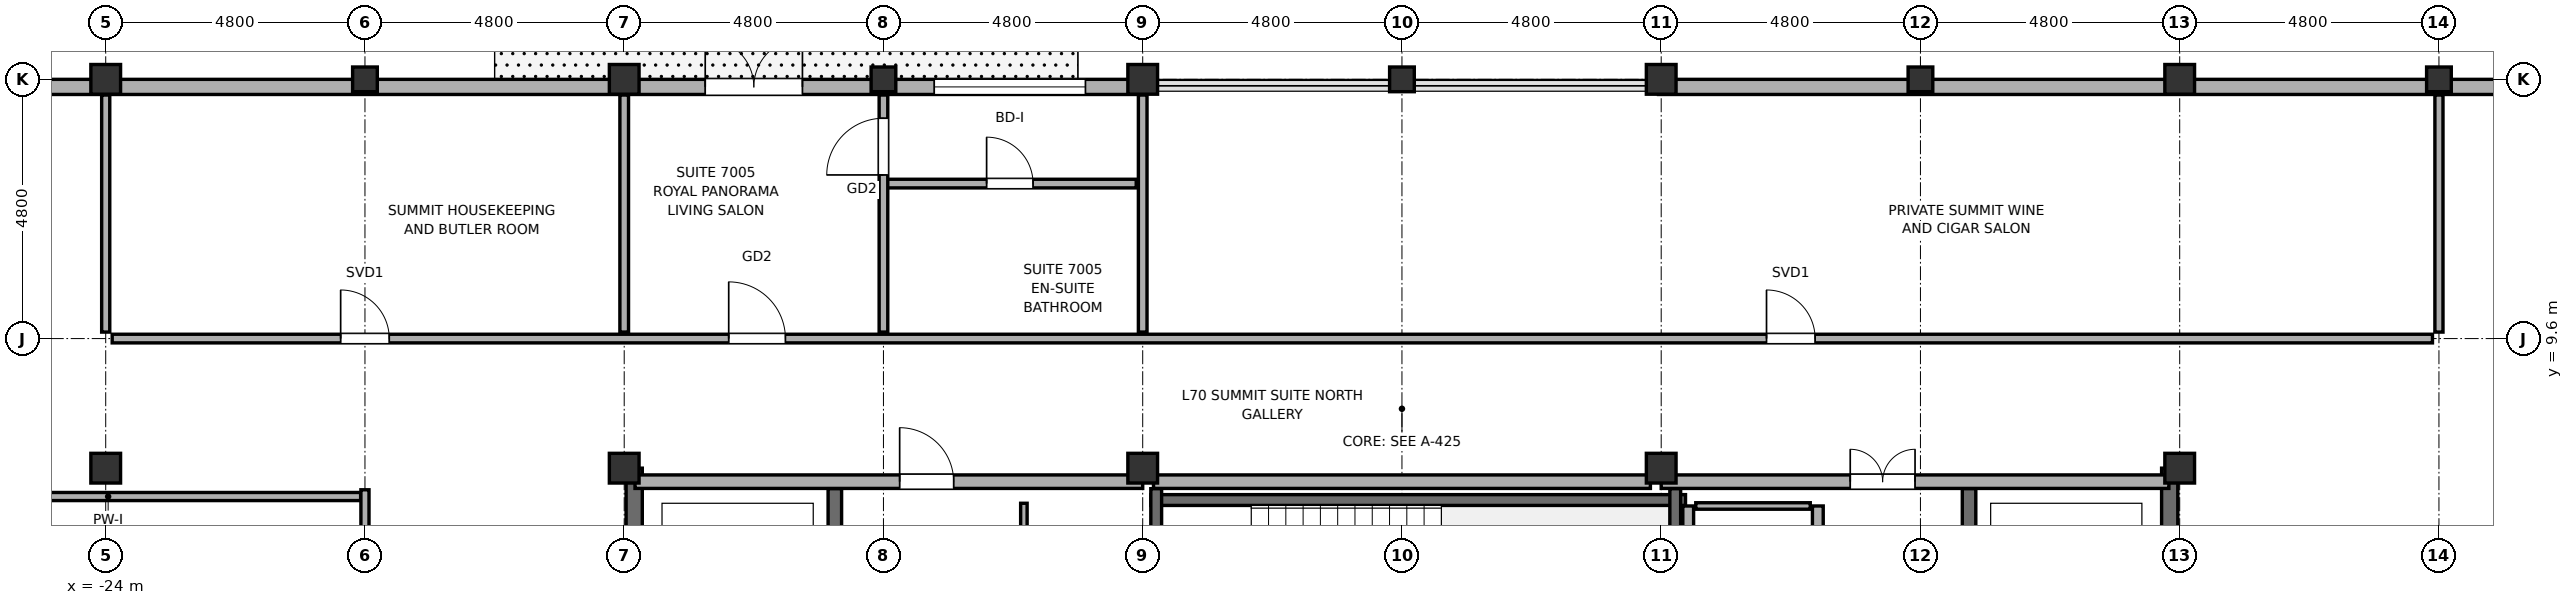
"""IFC4 building model, lengths in metres.
Left out: names, types, materials, properties, quantities, classifications, styles, units other than length and angle.
Written with IfcOpenShell. Run it as: python <this file> out.ifc"""

import sys

from ifc_helpers import new_model, si_unit, direction, frame, frame_2d, origin, origin_2d, place, context, subcontext, project, spatial, rectangle, hollow_rectangle, hollow_circle, extrude, element, fill, save


model = new_model("IFC4")
c1 = context("Model", 3, precision=1e-05, world=origin(), true_north=direction((0.0, 1.0)))
c2 = subcontext(c1, "Body", "Model", "MODEL_VIEW")
j1 = project(units=[si_unit("LENGTHUNIT", "METRE"), si_unit("PLANEANGLEUNIT", "RADIAN")], contexts=[c1])
p1 = place(None, origin())
s1 = spatial("IfcSite", under=j1, at=p1, CompositionType="ELEMENT")
p2 = place(p1, origin())
s2 = spatial("IfcBuilding", under=s1, at=p2, CompositionType="ELEMENT")
p3 = place(p2, frame((0.0, 0.0, 282.2)))
s3 = spatial("IfcBuildingStorey", under=s2, at=p3, CompositionType="ELEMENT", Elevation=282.2)
for number, where, z_axis, x_axis in (
    (1, (-24.0, 7.2, 0.0), (0.0, 0.0, 1.0), (1.0, 0.0, 0.0)),
    (2, (-24.0, 14.4, 0.0), (0.0, 0.0, 1.0), (1.0, 0.0, 0.0)),
):
    element("IfcColumn", number, at=place(p3, frame(where, z_axis=z_axis, x_axis=x_axis)), inside=s3, PredefinedType="COLUMN", context=c2, shape_type="SweptSolid", body=[
        extrude(hollow_rectangle(XDim=0.55, YDim=0.55, WallThickness=0.025, at=origin_2d()), origin(), (0.0, 0.0, 1.0), 4.2),
    ])
p4 = place(p3, frame((-19.2, 14.4, 0.0), z_axis=(0.0, 0.0, 1.0), x_axis=(1.0, 0.0, 0.0)))
e3 = element("IfcColumn", 3, at=p4, inside=s3, PredefinedType="COLUMN", context=c2, shape_type="SweptSolid", body=[
    extrude(hollow_circle(Radius=0.229, WallThickness=0.02, at=origin_2d()), origin(), (0.0, 0.0, 1.0), 4.2),
])
for number, where, z_axis, x_axis in (
    (4, (-14.4, 7.2, 0.0), (0.0, 0.0, 1.0), (1.0, 0.0, 0.0)),
    (5, (-14.4, 14.4, 0.0), (0.0, 0.0, 1.0), (1.0, 0.0, 0.0)),
):
    element("IfcColumn", number, at=place(p3, frame(where, z_axis=z_axis, x_axis=x_axis)), inside=s3, PredefinedType="COLUMN", context=c2, shape_type="SweptSolid", body=[
        extrude(hollow_rectangle(XDim=0.55, YDim=0.55, WallThickness=0.025, at=origin_2d()), origin(), (0.0, 0.0, 1.0), 4.2),
    ])
p5 = place(p3, frame((-9.6, 14.4, -0.2), z_axis=(0.0, 0.0, 1.0), x_axis=(1.0, 0.0, 0.0)))
e6 = element("IfcColumn", 6, at=p5, inside=s3, PredefinedType="COLUMN", context=c2, shape_type="SweptSolid", body=[
    extrude(hollow_circle(Radius=0.229, WallThickness=0.02, at=origin_2d()), origin(), (0.0, 0.0, 1.0), 4.4),
])
for number, where, z_axis, x_axis in (
    (7, (-4.8, 7.2, 0.0), (0.0, 0.0, 1.0), (1.0, 0.0, 0.0)),
    (8, (-4.8, 14.4, 0.0), (0.0, 0.0, 1.0), (1.0, 0.0, 0.0)),
):
    element("IfcColumn", number, at=place(p3, frame(where, z_axis=z_axis, x_axis=x_axis)), inside=s3, PredefinedType="COLUMN", context=c2, shape_type="SweptSolid", body=[
        extrude(hollow_rectangle(XDim=0.55, YDim=0.55, WallThickness=0.025, at=origin_2d()), origin(), (0.0, 0.0, 1.0), 4.2),
    ])
p6 = place(p3, frame((0.0, 14.4, -0.2), z_axis=(0.0, 0.0, 1.0), x_axis=(1.0, 0.0, 0.0)))
e9 = element("IfcColumn", 9, at=p6, inside=s3, PredefinedType="COLUMN", context=c2, shape_type="SweptSolid", body=[
    extrude(hollow_circle(Radius=0.229, WallThickness=0.02, at=origin_2d()), origin(), (0.0, 0.0, 1.0), 4.4),
])
for number, where, z_axis, x_axis in (
    (10, (4.8, 7.2, 0.0), (0.0, 0.0, 1.0), (1.0, 0.0, 0.0)),
    (11, (4.8, 14.4, 0.0), (0.0, 0.0, 1.0), (1.0, 0.0, 0.0)),
):
    element("IfcColumn", number, at=place(p3, frame(where, z_axis=z_axis, x_axis=x_axis)), inside=s3, PredefinedType="COLUMN", context=c2, shape_type="SweptSolid", body=[
        extrude(hollow_rectangle(XDim=0.55, YDim=0.55, WallThickness=0.025, at=origin_2d()), origin(), (0.0, 0.0, 1.0), 4.2),
    ])
p7 = place(p3, frame((9.6, 14.4, -0.2), z_axis=(0.0, 0.0, 1.0), x_axis=(1.0, 0.0, 0.0)))
e12 = element("IfcColumn", 12, at=p7, inside=s3, PredefinedType="COLUMN", context=c2, shape_type="SweptSolid", body=[
    extrude(hollow_circle(Radius=0.229, WallThickness=0.02, at=origin_2d()), origin(), (0.0, 0.0, 1.0), 4.4),
])
for number, where, z_axis, x_axis in (
    (13, (14.4, 7.2, 0.0), (0.0, 0.0, 1.0), (1.0, 0.0, 0.0)),
    (14, (14.4, 14.4, 0.0), (0.0, 0.0, 1.0), (1.0, 0.0, 0.0)),
):
    element("IfcColumn", number, at=place(p3, frame(where, z_axis=z_axis, x_axis=x_axis)), inside=s3, PredefinedType="COLUMN", context=c2, shape_type="SweptSolid", body=[
        extrude(hollow_rectangle(XDim=0.55, YDim=0.55, WallThickness=0.025, at=origin_2d()), origin(), (0.0, 0.0, 1.0), 4.2),
    ])
p8 = place(p3, frame((19.2, 14.4, 0.0), z_axis=(0.0, 0.0, 1.0), x_axis=(1.0, 0.0, 0.0)))
e15 = element("IfcColumn", 15, at=p8, inside=s3, PredefinedType="COLUMN", context=c2, shape_type="SweptSolid", body=[
    extrude(hollow_circle(Radius=0.229, WallThickness=0.02, at=origin_2d()), origin(), (0.0, 0.0, 1.0), 4.2),
])
for number, where, z_axis, x_axis in (
    (16, (-14.215, -7.2, -0.2), (0.0, 0.0, 1.0), (0.0, 1.0, 0.0)),
    (17, (14.215, -7.2, -0.2), (0.0, 0.0, 1.0), (0.0, 1.0, 0.0)),
):
    element("IfcWall", number, at=place(p3, frame(where, z_axis=z_axis, x_axis=x_axis)), inside=s3, PredefinedType="SHEAR", context=c2, shape_type="SweptSolid", body=[
        extrude(rectangle(XDim=14.4, YDim=0.3, at=frame_2d((7.2, 0.0))), origin(), (0.0, 0.0, 1.0), 4.2),
    ])
p9 = place(p3, frame((-25.2, 14.26, 0.0), z_axis=(0.0, 0.0, 1.0), x_axis=(1.0, 0.0, 0.0)))
e18 = element("IfcWall", 18, at=p9, inside=s3, PredefinedType="SOLIDWALL", context=c2, shape_type="SweptSolid", body=[
    extrude(rectangle(XDim=20.45, YDim=0.28, at=frame_2d((10.225, 0.0))), origin(), (0.0, 0.0, 1.0), 2.6),
])
p10 = place(p9, frame((12.3, 0.0, 0.0)))
e19 = element("IfcOpeningElement", 19, at=p10, cuts=e18, PredefinedType="OPENING", context=c2, shape_type="SweptSolid", body=[
    extrude(rectangle(XDim=1.8, YDim=2.2, at=frame_2d((0.9, 1.1))), frame((0.0, 0.155, 0.0), z_axis=(0.0, -1.0, 0.0), x_axis=(1.0, 0.0, 0.0)), (0.0, 0.0, 1.0), 0.31),
])
p11 = place(p9, frame((16.54, 0.0, 0.75)))
e20 = element("IfcOpeningElement", 20, at=p11, cuts=e18, PredefinedType="OPENING", context=c2, shape_type="SweptSolid", body=[
    extrude(rectangle(XDim=2.8, YDim=1.7, at=frame_2d((1.4, 0.85))), frame((0.0, 0.155, 0.0), z_axis=(0.0, -1.0, 0.0), x_axis=(1.0, 0.0, 0.0)), (0.0, 0.0, 1.0), 0.31),
])
p12 = place(p3, frame((4.75, 14.26, 0.0), z_axis=(0.0, 0.0, 1.0), x_axis=(1.0, 0.0, 0.0)))
e21 = element("IfcWall", 21, at=p12, inside=s3, PredefinedType="SOLIDWALL", context=c2, shape_type="SweptSolid", body=[
    extrude(rectangle(XDim=15.65, YDim=0.28, at=frame_2d((7.825, 0.0))), origin(), (0.0, 0.0, 1.0), 2.6),
])
p13 = place(p3, frame((-14.2, 6.95, 0.0), z_axis=(0.0, 0.0, 1.0), x_axis=(1.0, 0.0, 0.0)))
e22 = element("IfcWall", 22, at=p13, inside=s3, PredefinedType="SOLIDWALL", context=c2, shape_type="SweptSolid", body=[
    extrude(rectangle(XDim=9.4, YDim=0.25, at=frame_2d((4.7, 0.0))), origin(), (0.0, 0.0, 1.0), 2.6),
])
p14 = place(p13, frame((4.9, 0.0, 0.0)))
e23 = element("IfcOpeningElement", 23, at=p14, cuts=e22, PredefinedType="OPENING", context=c2, shape_type="SweptSolid", body=[
    extrude(rectangle(XDim=1.0, YDim=2.15, at=frame_2d((0.5, 1.075))), frame((0.0, 0.14, 0.0), z_axis=(0.0, -1.0, 0.0), x_axis=(1.0, 0.0, 0.0)), (0.0, 0.0, 1.0), 0.28),
])
p15 = place(p3, frame((-4.6, 6.95, 0.0), z_axis=(0.0, 0.0, 1.0), x_axis=(1.0, 0.0, 0.0)))
e24 = element("IfcWall", 24, at=p15, inside=s3, PredefinedType="SOLIDWALL", context=c2, shape_type="SweptSolid", body=[
    extrude(rectangle(XDim=9.2, YDim=0.25, at=frame_2d((4.6, 0.0))), origin(), (0.0, 0.0, 1.0), 2.6),
])
p16 = place(p3, frame((4.8, 6.95, 0.0), z_axis=(0.0, 0.0, 1.0), x_axis=(1.0, 0.0, 0.0)))
e25 = element("IfcWall", 25, at=p16, inside=s3, PredefinedType="SOLIDWALL", context=c2, shape_type="SweptSolid", body=[
    extrude(rectangle(XDim=9.4, YDim=0.25, at=frame_2d((4.7, 0.0))), origin(), (0.0, 0.0, 1.0), 2.6),
])
p17 = place(p16, frame((3.5, 0.0, 0.0)))
e26 = element("IfcOpeningElement", 26, at=p17, cuts=e25, PredefinedType="OPENING", context=c2, shape_type="SweptSolid", body=[
    extrude(rectangle(XDim=1.2, YDim=2.2, at=frame_2d((0.6, 1.1))), frame((0.0, 0.14, 0.0), z_axis=(0.0, -1.0, 0.0), x_axis=(1.0, 0.0, 0.0)), (0.0, 0.0, 1.0), 0.28),
])
p18 = place(p3, frame((-10.5, -6.82, -0.2), z_axis=(0.0, 0.0, 1.0), x_axis=(0.0, 1.0, 0.0)))
e27 = element("IfcWall", 27, at=p18, inside=s3, PredefinedType="SOLIDWALL", context=c2, shape_type="SweptSolid", body=[
    extrude(rectangle(XDim=13.64, YDim=0.25, at=frame_2d((6.82, 0.0))), origin(), (0.0, 0.0, 1.0), 4.2),
])
p19 = place(p18, frame((2.32, 0.0, 0.2)))
e28 = element("IfcOpeningElement", 28, at=p19, cuts=e27, PredefinedType="OPENING", context=c2, shape_type="SweptSolid", body=[
    extrude(rectangle(XDim=0.95, YDim=2.15, at=frame_2d((0.475, 1.075))), frame((0.0, 0.14, 0.0), z_axis=(0.0, -1.0, 0.0), x_axis=(1.0, 0.0, 0.0)), (0.0, 0.0, 1.0), 0.28),
])
p20 = place(p3, frame((10.5, -6.82, -0.2), z_axis=(0.0, 0.0, 1.0), x_axis=(0.0, 1.0, 0.0)))
e29 = element("IfcWall", 29, at=p20, inside=s3, PredefinedType="SOLIDWALL", context=c2, shape_type="SweptSolid", body=[
    extrude(rectangle(XDim=13.64, YDim=0.25, at=frame_2d((6.82, 0.0))), origin(), (0.0, 0.0, 1.0), 4.2),
])
p21 = place(p20, frame((2.32, 0.0, 0.2)))
e30 = element("IfcOpeningElement", 30, at=p21, cuts=e29, PredefinedType="OPENING", context=c2, shape_type="SweptSolid", body=[
    extrude(rectangle(XDim=0.95, YDim=2.15, at=frame_2d((0.475, 1.075))), frame((0.0, 0.14, 0.0), z_axis=(0.0, -1.0, 0.0), x_axis=(1.0, 0.0, 0.0)), (0.0, 0.0, 1.0), 0.28),
])
p22 = place(p3, frame((-4.65, 6.61, -0.2), z_axis=(0.0, 0.0, 1.0), x_axis=(1.0, 0.0, 0.0)))
e31 = element("IfcWall", 31, at=p22, inside=s3, PredefinedType="SOLIDWALL", context=c2, shape_type="SweptSolid", body=[
    extrude(rectangle(XDim=9.9, YDim=0.2, at=frame_2d((4.95, 0.0))), origin(), (0.0, 0.0, 1.0), 4.2),
])
for number, where, z_axis, x_axis in (
    (32, (-4.55, 3.08, -0.2), (0.0, 0.0, 1.0), (0.0, 1.0, 0.0)),
    (33, (5.06, 3.08, -0.2), (0.0, 0.0, 1.0), (0.0, 1.0, 0.0)),
):
    element("IfcWall", number, at=place(p3, frame(where, z_axis=z_axis, x_axis=x_axis)), inside=s3, PredefinedType="SOLIDWALL", context=c2, shape_type="SweptSolid", body=[
        extrude(rectangle(XDim=3.74, YDim=0.2, at=frame_2d((1.87, 0.0))), origin(), (0.0, 0.0, 1.0), 4.2),
    ])
for number, where, z_axis, x_axis in (
    (34, (7.7, -0.3, 0.0), (0.0, 0.0, 1.0), (0.0, 1.0, 0.0)),
    (35, (5.3, -0.3, 0.0), (0.0, 0.0, 1.0), (0.0, 1.0, 0.0)),
):
    element("IfcWall", number, at=place(p3, frame(where, z_axis=z_axis, x_axis=x_axis)), inside=s3, PredefinedType="SOLIDWALL", context=c2, shape_type="SweptSolid", body=[
        extrude(rectangle(XDim=6.8, YDim=0.2, at=frame_2d((3.4, 0.0))), origin(), (0.0, 0.0, 1.0), 4.0),
    ])
p23 = place(p3, frame((5.44, 6.5, 0.0), z_axis=(0.0, 0.0, 1.0), x_axis=(1.0, 0.0, 0.0)))
e36 = element("IfcWall", 36, at=p23, inside=s3, PredefinedType="PARTITIONING", context=c2, shape_type="SweptSolid", body=[
    extrude(rectangle(XDim=2.12, YDim=0.12, at=frame_2d((1.06, 0.0))), origin(), (0.0, 0.0, 1.0), 4.0),
])
p24 = place(p3, frame((-28.63, 6.675, 0.0), z_axis=(0.0, 0.0, 1.0), x_axis=(1.0, 0.0, 0.0)))
e37 = element("IfcWall", 37, at=p24, inside=s3, PredefinedType="PARTITIONING", context=c2, shape_type="SweptSolid", body=[
    extrude(rectangle(XDim=9.35, YDim=0.15, at=frame_2d((4.675, 0.0))), origin(), (0.0, 0.0, 1.0), 3.56),
])
p25 = place(p3, frame((-23.88, 9.6, 0.0), z_axis=(0.0, 0.0, 1.0), x_axis=(1.0, 0.0, 0.0)))
e38 = element("IfcWall", 38, at=p25, inside=s3, PredefinedType="PARTITIONING", context=c2, shape_type="SweptSolid", body=[
    extrude(rectangle(XDim=42.96, YDim=0.16, at=frame_2d((21.48, 0.0))), origin(), (0.0, 0.0, 1.0), 2.6),
])
p26 = place(p25, frame((4.23, 0.0, 0.0)))
e39 = element("IfcOpeningElement", 39, at=p26, cuts=e38, PredefinedType="OPENING", context=c2, shape_type="SweptSolid", body=[
    extrude(rectangle(XDim=0.9, YDim=2.1, at=frame_2d((0.45, 1.05))), frame((0.0, 0.095, 0.0), z_axis=(0.0, -1.0, 0.0), x_axis=(1.0, 0.0, 0.0)), (0.0, 0.0, 1.0), 0.19),
])
p27 = place(p25, frame((11.415, 0.0, 0.0)))
e40 = element("IfcOpeningElement", 40, at=p27, cuts=e38, PredefinedType="OPENING", context=c2, shape_type="SweptSolid", body=[
    extrude(rectangle(XDim=1.05, YDim=2.2, at=frame_2d((0.525, 1.1))), frame((0.0, 0.095, 0.0), z_axis=(0.0, -1.0, 0.0), x_axis=(1.0, 0.0, 0.0)), (0.0, 0.0, 1.0), 0.19),
])
p28 = place(p25, frame((30.63, 0.0, 0.0)))
e41 = element("IfcOpeningElement", 41, at=p28, cuts=e38, PredefinedType="OPENING", context=c2, shape_type="SweptSolid", body=[
    extrude(rectangle(XDim=0.9, YDim=2.1, at=frame_2d((0.45, 1.05))), frame((0.0, 0.095, 0.0), z_axis=(0.0, -1.0, 0.0), x_axis=(1.0, 0.0, 0.0)), (0.0, 0.0, 1.0), 0.19),
])
p29 = place(p3, frame((-9.6, 12.47, 0.0), z_axis=(0.0, 0.0, 1.0), x_axis=(1.0, 0.0, 0.0)))
e42 = element("IfcWall", 42, at=p29, inside=s3, PredefinedType="PARTITIONING", context=c2, shape_type="SweptSolid", body=[
    extrude(rectangle(XDim=4.68, YDim=0.16, at=frame_2d((2.34, 0.0))), origin(), (0.0, 0.0, 1.0), 3.56),
])
p30 = place(p29, frame((1.91, 0.0, 0.0)))
e43 = element("IfcOpeningElement", 43, at=p30, cuts=e42, PredefinedType="OPENING", context=c2, shape_type="SweptSolid", body=[
    extrude(rectangle(XDim=0.86, YDim=2.1, at=frame_2d((0.43, 1.05))), frame((0.0, 0.095, 0.0), z_axis=(0.0, -1.0, 0.0), x_axis=(1.0, 0.0, 0.0)), (0.0, 0.0, 1.0), 0.19),
])
p31 = place(p3, frame((-24.0, 9.72, 0.0), z_axis=(0.0, 0.0, 1.0), x_axis=(0.0, 1.0, 0.0)))
e44 = element("IfcWall", 44, at=p31, inside=s3, PredefinedType="PARTITIONING", context=c2, shape_type="SweptSolid", body=[
    extrude(rectangle(XDim=4.39, YDim=0.15, at=frame_2d((2.195, 0.0))), origin(), (0.0, 0.0, 1.0), 2.6),
])
p32 = place(p3, frame((-19.2, -6.715, 0.0), z_axis=(0.0, 0.0, 1.0), x_axis=(0.0, 1.0, 0.0)))
e45 = element("IfcWall", 45, at=p32, inside=s3, PredefinedType="PARTITIONING", context=c2, shape_type="SweptSolid", body=[
    extrude(rectangle(XDim=13.515, YDim=0.15, at=frame_2d((6.758, 0.0))), origin(), (0.0, 0.0, 1.0), 2.6),
])
p33 = place(p32, frame((6.265, 0.0, 0.0)))
e46 = element("IfcOpeningElement", 46, at=p33, cuts=e45, PredefinedType="OPENING", context=c2, shape_type="SweptSolid", body=[
    extrude(rectangle(XDim=0.9, YDim=2.1, at=frame_2d((0.45, 1.05))), frame((0.0, 0.09, 0.0), z_axis=(0.0, -1.0, 0.0), x_axis=(1.0, 0.0, 0.0)), (0.0, 0.0, 1.0), 0.18),
])
p34 = place(p3, frame((-14.4, 9.72, 0.0), z_axis=(0.0, 0.0, 1.0), x_axis=(0.0, 1.0, 0.0)))
e47 = element("IfcWall", 47, at=p34, inside=s3, PredefinedType="PARTITIONING", context=c2, shape_type="SweptSolid", body=[
    extrude(rectangle(XDim=4.39, YDim=0.16, at=frame_2d((2.195, 0.0))), origin(), (0.0, 0.0, 1.0), 2.6),
])
p35 = place(p3, frame((-9.6, 9.72, 0.0), z_axis=(0.0, 0.0, 1.0), x_axis=(0.0, 1.0, 0.0)))
e48 = element("IfcWall", 48, at=p35, inside=s3, PredefinedType="PARTITIONING", context=c2, shape_type="SweptSolid", body=[
    extrude(rectangle(XDim=4.39, YDim=0.16, at=frame_2d((2.195, 0.0))), origin(), (0.0, 0.0, 1.0), 2.6),
])
p36 = place(p35, frame((2.91, 0.0, 0.0)))
e49 = element("IfcOpeningElement", 49, at=p36, cuts=e48, PredefinedType="OPENING", context=c2, shape_type="SweptSolid", body=[
    extrude(rectangle(XDim=1.05, YDim=2.2, at=frame_2d((0.525, 1.1))), frame((0.0, 0.095, 0.0), z_axis=(0.0, -1.0, 0.0), x_axis=(1.0, 0.0, 0.0)), (0.0, 0.0, 1.0), 0.19),
])
p37 = place(p3, frame((-7.0, 2.835, 0.0), z_axis=(0.0, 0.0, 1.0), x_axis=(0.0, 1.0, 0.0)))
e50 = element("IfcWall", 50, at=p37, inside=s3, PredefinedType="PARTITIONING", context=c2, shape_type="SweptSolid", body=[
    extrude(rectangle(XDim=3.715, YDim=0.12, at=frame_2d((1.857, 0.0))), origin(), (0.0, 0.0, 1.0), 4.0),
])
p38 = place(p37, frame((1.365, 0.0, 0.0)))
e51 = element("IfcOpeningElement", 51, at=p38, cuts=e50, PredefinedType="OPENING", context=c2, shape_type="SweptSolid", body=[
    extrude(rectangle(XDim=0.9, YDim=2.1, at=frame_2d((0.45, 1.05))), frame((0.0, 0.075, 0.0), z_axis=(0.0, -1.0, 0.0), x_axis=(1.0, 0.0, 0.0)), (0.0, 0.0, 1.0), 0.15),
])
p39 = place(p3, frame((-4.8, 9.72, 0.0), z_axis=(0.0, 0.0, 1.0), x_axis=(0.0, 1.0, 0.0)))
e52 = element("IfcWall", 52, at=p39, inside=s3, PredefinedType="PARTITIONING", context=c2, shape_type="SweptSolid", body=[
    extrude(rectangle(XDim=4.39, YDim=0.16, at=frame_2d((2.195, 0.0))), origin(), (0.0, 0.0, 1.0), 2.6),
])
p40 = place(p3, frame((19.2, 9.72, 0.0), z_axis=(0.0, 0.0, 1.0), x_axis=(0.0, 1.0, 0.0)))
e53 = element("IfcWall", 53, at=p40, inside=s3, PredefinedType="PARTITIONING", context=c2, shape_type="SweptSolid", body=[
    extrude(rectangle(XDim=4.39, YDim=0.15, at=frame_2d((2.195, 0.0))), origin(), (0.0, 0.0, 1.0), 2.6),
])
p41 = place(p10, origin())
e54 = element("IfcDoor", 54, at=p41, inside=s3, OperationType="DOUBLE_DOOR_SINGLE_SWING", PredefinedType="DOOR", context=c2, shape_type="SweptSolid", body=[
    extrude(rectangle(XDim=1.8, YDim=2.2, at=frame_2d((0.9, 1.1))), frame((0.0, 0.025, 0.0), z_axis=(0.0, -1.0, 0.0), x_axis=(1.0, 0.0, 0.0)), (0.0, 0.0, 1.0), 0.05),
])
fill(e19, e54)
p42 = place(p11, origin())
e55 = element("IfcWindow", 55, at=p42, inside=s3, PartitioningType="SINGLE_PANEL", PredefinedType="WINDOW", context=c2, shape_type="SweptSolid", body=[
    extrude(rectangle(XDim=2.8, YDim=1.7, at=frame_2d((1.4, 0.85))), frame((0.0, 0.03, 0.0), z_axis=(0.0, -1.0, 0.0), x_axis=(1.0, 0.0, 0.0)), (0.0, 0.0, 1.0), 0.06),
])
fill(e20, e55)
p43 = place(p14, origin())
e56 = element("IfcDoor", 56, at=p43, inside=s3, OperationType="SINGLE_SWING_RIGHT", PredefinedType="DOOR", context=c2, shape_type="SweptSolid", body=[
    extrude(rectangle(XDim=1.0, YDim=2.15, at=frame_2d((0.5, 1.075))), frame((0.0, 0.025, 0.0), z_axis=(0.0, -1.0, 0.0), x_axis=(1.0, 0.0, 0.0)), (0.0, 0.0, 1.0), 0.05),
])
fill(e23, e56)
p44 = place(p17, origin())
e57 = element("IfcDoor", 57, at=p44, inside=s3, OperationType="DOUBLE_DOOR_SINGLE_SWING", PredefinedType="DOOR", context=c2, shape_type="SweptSolid", body=[
    extrude(rectangle(XDim=1.2, YDim=2.2, at=frame_2d((0.6, 1.1))), frame((0.0, 0.025, 0.0), z_axis=(0.0, -1.0, 0.0), x_axis=(1.0, 0.0, 0.0)), (0.0, 0.0, 1.0), 0.05),
])
fill(e26, e57)
p45 = place(p26, origin())
e58 = element("IfcDoor", 58, at=p45, inside=s3, OperationType="SINGLE_SWING_LEFT", PredefinedType="DOOR", context=c2, shape_type="SweptSolid", body=[
    extrude(rectangle(XDim=0.9, YDim=2.1, at=frame_2d((0.45, 1.05))), frame((0.0, 0.025, 0.0), z_axis=(0.0, -1.0, 0.0), x_axis=(1.0, 0.0, 0.0)), (0.0, 0.0, 1.0), 0.05),
])
fill(e39, e58)
p46 = place(p27, origin())
e59 = element("IfcDoor", 59, at=p46, inside=s3, OperationType="SINGLE_SWING_RIGHT", PredefinedType="DOOR", context=c2, shape_type="SweptSolid", body=[
    extrude(rectangle(XDim=1.05, YDim=2.2, at=frame_2d((0.525, 1.1))), frame((0.0, 0.025, 0.0), z_axis=(0.0, -1.0, 0.0), x_axis=(1.0, 0.0, 0.0)), (0.0, 0.0, 1.0), 0.05),
])
fill(e40, e59)
p47 = place(p36, origin())
e60 = element("IfcDoor", 60, at=p47, inside=s3, OperationType="SINGLE_SWING_LEFT", PredefinedType="DOOR", context=c2, shape_type="SweptSolid", body=[
    extrude(rectangle(XDim=1.05, YDim=2.2, at=frame_2d((0.525, 1.1))), frame((0.0, 0.025, 0.0), z_axis=(0.0, -1.0, 0.0), x_axis=(1.0, 0.0, 0.0)), (0.0, 0.0, 1.0), 0.05),
])
fill(e49, e60)
p48 = place(p30, origin())
e61 = element("IfcDoor", 61, at=p48, inside=s3, OperationType="SINGLE_SWING_RIGHT", PredefinedType="DOOR", context=c2, shape_type="SweptSolid", body=[
    extrude(rectangle(XDim=0.86, YDim=2.1, at=frame_2d((0.43, 1.05))), frame((0.0, 0.025, 0.0), z_axis=(0.0, -1.0, 0.0), x_axis=(1.0, 0.0, 0.0)), (0.0, 0.0, 1.0), 0.05),
])
fill(e43, e61)
p49 = place(p28, origin())
e62 = element("IfcDoor", 62, at=p49, inside=s3, OperationType="SINGLE_SWING_LEFT", PredefinedType="DOOR", context=c2, shape_type="SweptSolid", body=[
    extrude(rectangle(XDim=0.9, YDim=2.1, at=frame_2d((0.45, 1.05))), frame((0.0, 0.025, 0.0), z_axis=(0.0, -1.0, 0.0), x_axis=(1.0, 0.0, 0.0)), (0.0, 0.0, 1.0), 0.05),
])
fill(e41, e62)
save(model, sys.argv[1])
